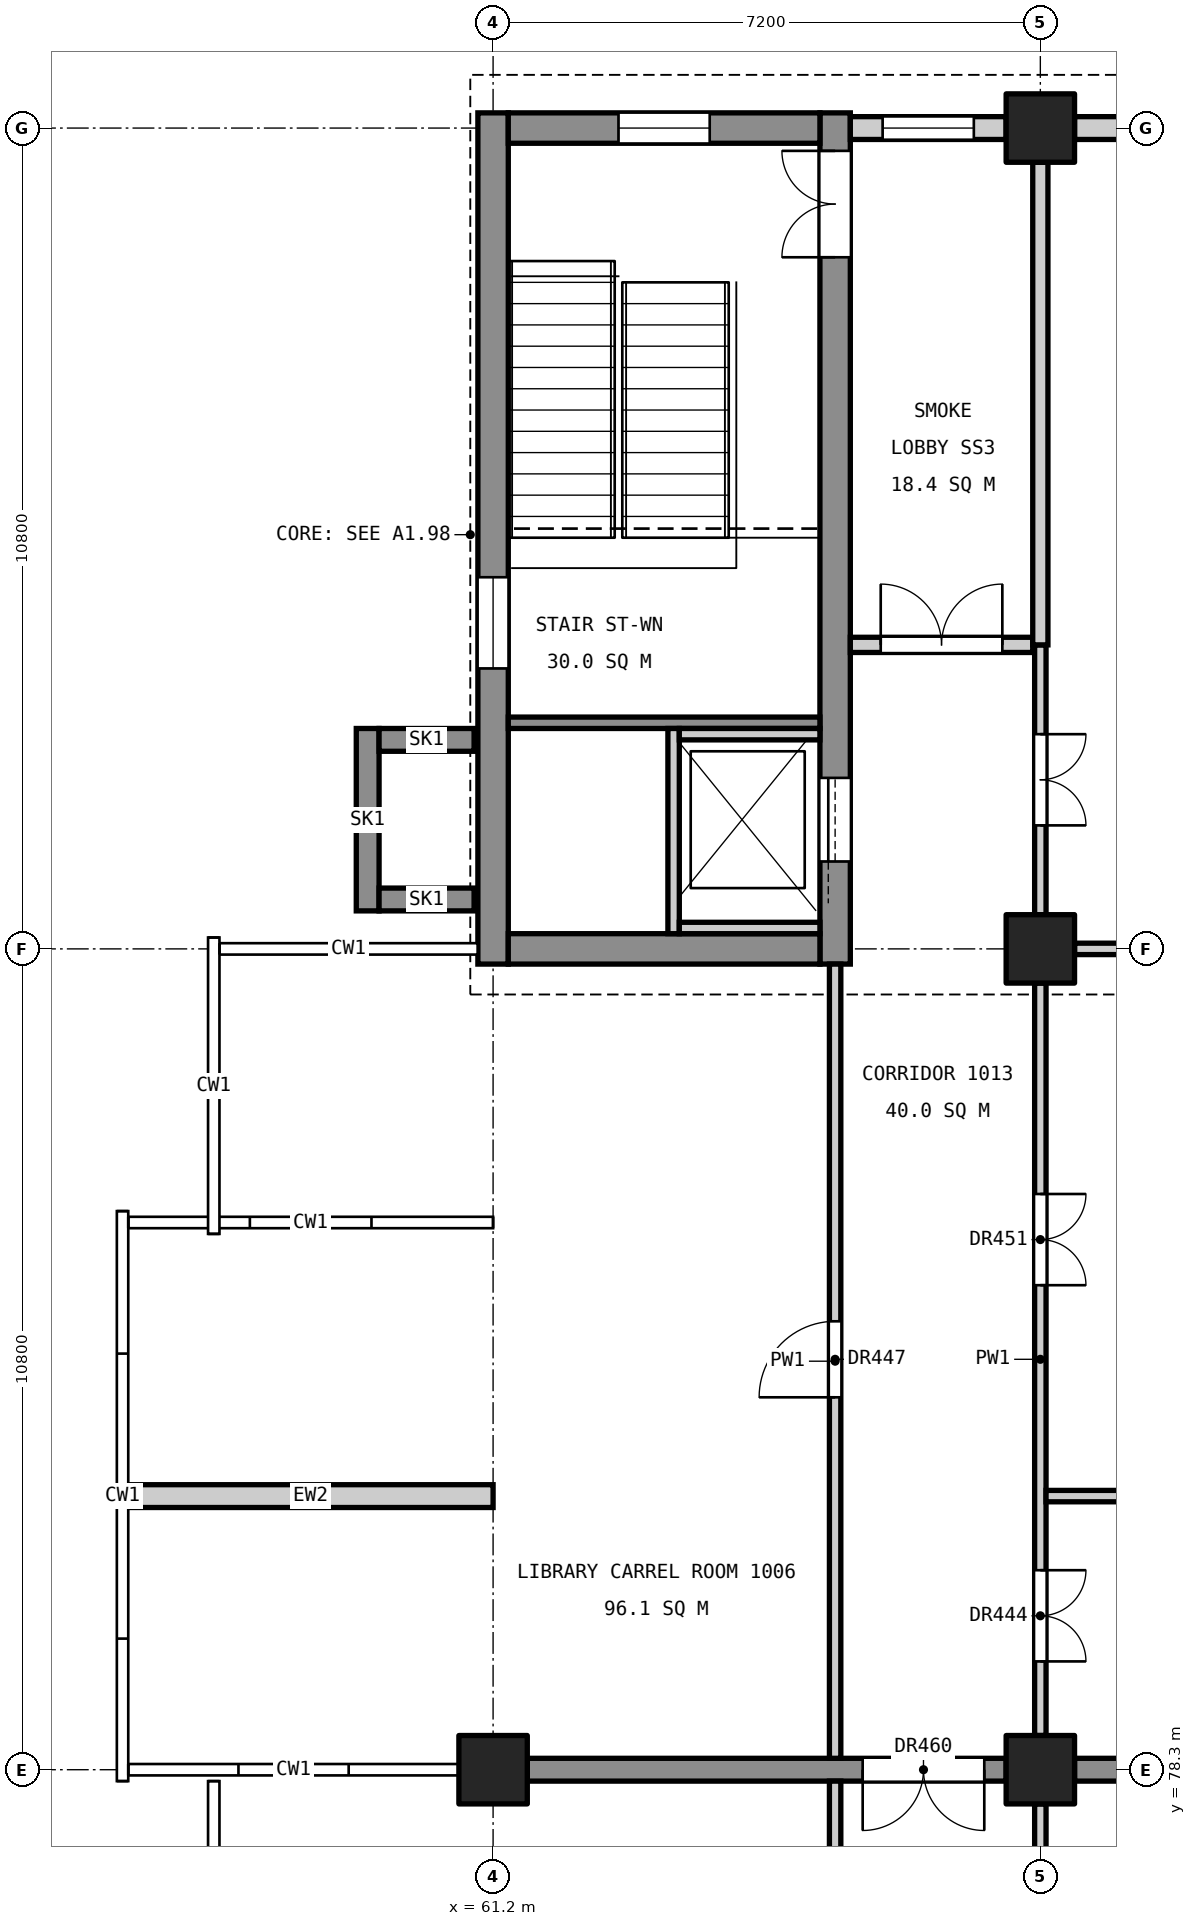
"""IFC4 building model, lengths in metres.
Left out: names, types, materials, properties, quantities, classifications, styles, units other than length and angle.
Written with IfcOpenShell. Run it as: python <this file> out.ifc"""

import sys

from ifc_helpers import new_model, si_unit, direction, frame, frame_2d, origin, origin_2d, place, context, subcontext, project, spatial, rectangle, extrude, element, fill, save


model = new_model("IFC4")
c1 = context("Model", 3, precision=1e-05, world=origin(), true_north=direction((0.0, 1.0)))
c2 = subcontext(c1, "Body", "Model", "MODEL_VIEW")
j1 = project(units=[si_unit("LENGTHUNIT", "METRE"), si_unit("PLANEANGLEUNIT", "RADIAN")], contexts=[c1])
p1 = place(None, origin())
s1 = spatial("IfcSite", under=j1, at=p1, CompositionType="ELEMENT")
p2 = place(p1, origin())
s2 = spatial("IfcBuilding", under=s1, at=p2, CompositionType="ELEMENT")
p3 = place(p2, frame((0.0, 0.0, 51.0)))
s3 = spatial("IfcBuildingStorey", under=s2, at=p3, CompositionType="ELEMENT", Elevation=51.0)
for number, where, z_axis, x_axis in (
    (1, (61.2, 78.3, 0.0), (0.0, 0.0, 1.0), (1.0, 0.0, 0.0)),
    (2, (68.4, 78.3, 0.0), (0.0, 0.0, 1.0), (1.0, 0.0, 0.0)),
    (3, (68.4, 89.1, 0.0), (0.0, 0.0, 1.0), (1.0, 0.0, 0.0)),
    (4, (68.4, 99.9, 0.0), (0.0, 0.0, 1.0), (1.0, 0.0, 0.0)),
):
    element("IfcColumn", number, at=place(p3, frame(where, z_axis=z_axis, x_axis=x_axis)), inside=s3, PredefinedType="COLUMN", context=c2, shape_type="SweptSolid", body=[
        extrude(rectangle(XDim=0.9, YDim=0.9, at=origin_2d()), origin(), (0.0, 0.0, 1.0), 4.8),
    ])
p4 = place(p3, frame((61.2, 88.9, 0.0), z_axis=(0.0, 0.0, 1.0), x_axis=(0.0, 1.0, 0.0)))
e5 = element("IfcWall", 5, at=p4, inside=s3, PredefinedType="SHEAR", context=c2, shape_type="SweptSolid", body=[
    extrude(rectangle(XDim=11.2, YDim=0.4, at=frame_2d((5.6, 0.0))), origin(), (0.0, 0.0, 1.0), 4.55),
])
p5 = place(p4, frame((3.89, 0.0, 3.4)))
e6 = element("IfcOpeningElement", 6, at=p5, cuts=e5, PredefinedType="OPENING", context=c2, shape_type="SweptSolid", body=[
    extrude(rectangle(XDim=1.2, YDim=0.9, at=frame_2d((0.6, 0.45))), frame((0.0, 0.21, 0.0), z_axis=(0.0, -1.0, 0.0), x_axis=(1.0, 0.0, 0.0)), (0.0, 0.0, 1.0), 0.42),
])
p6 = place(p3, frame((65.7, 88.9, 0.0), z_axis=(0.0, 0.0, 1.0), x_axis=(0.0, 1.0, 0.0)))
e7 = element("IfcWall", 7, at=p6, inside=s3, PredefinedType="SHEAR", context=c2, shape_type="SweptSolid", body=[
    extrude(rectangle(XDim=11.2, YDim=0.4, at=frame_2d((5.6, 0.0))), origin(), (0.0, 0.0, 1.0), 4.55),
])
p7 = place(p6, frame((9.3, 0.0, 0.0)))
e8 = element("IfcOpeningElement", 8, at=p7, cuts=e7, PredefinedType="OPENING", context=c2, shape_type="SweptSolid", body=[
    extrude(rectangle(XDim=1.4, YDim=2.1, at=frame_2d((0.7, 1.05))), frame((0.0, 0.21, 0.0), z_axis=(0.0, -1.0, 0.0), x_axis=(1.0, 0.0, 0.0)), (0.0, 0.0, 1.0), 0.42),
])
p8 = place(p6, frame((1.35, 0.0, 0.0)))
e9 = element("IfcOpeningElement", 9, at=p8, cuts=e7, PredefinedType="OPENING", context=c2, shape_type="SweptSolid", body=[
    extrude(rectangle(XDim=1.1, YDim=2.1, at=frame_2d((0.55, 1.05))), frame((0.0, 0.21, 0.0), z_axis=(0.0, -1.0, 0.0), x_axis=(1.0, 0.0, 0.0)), (0.0, 0.0, 1.0), 0.42),
])
p9 = place(p3, frame((61.4, 89.1, 0.0), z_axis=(0.0, 0.0, 1.0), x_axis=(1.0, 0.0, 0.0)))
e10 = element("IfcWall", 10, at=p9, inside=s3, PredefinedType="SHEAR", context=c2, shape_type="SweptSolid", body=[
    extrude(rectangle(XDim=4.1, YDim=0.4, at=frame_2d((2.05, 0.0))), origin(), (0.0, 0.0, 1.0), 4.55),
])
p10 = place(p3, frame((61.4, 99.9, 0.0), z_axis=(0.0, 0.0, 1.0), x_axis=(1.0, 0.0, 0.0)))
e11 = element("IfcWall", 11, at=p10, inside=s3, PredefinedType="SHEAR", context=c2, shape_type="SweptSolid", body=[
    extrude(rectangle(XDim=4.1, YDim=0.4, at=frame_2d((2.05, 0.0))), origin(), (0.0, 0.0, 1.0), 4.55),
])
p11 = place(p10, frame((1.45, 0.0, 3.4)))
e12 = element("IfcOpeningElement", 12, at=p11, cuts=e11, PredefinedType="OPENING", context=c2, shape_type="SweptSolid", body=[
    extrude(rectangle(XDim=1.2, YDim=0.9, at=frame_2d((0.6, 0.45))), frame((0.0, 0.21, 0.0), z_axis=(0.0, -1.0, 0.0), x_axis=(1.0, 0.0, 0.0)), (0.0, 0.0, 1.0), 0.42),
])
p12 = place(p3, frame((59.55, 89.6, 0.0), z_axis=(0.0, 0.0, 1.0), x_axis=(0.0, 1.0, 0.0)))
e13 = element("IfcWall", 13, at=p12, inside=s3, PredefinedType="SHEAR", context=c2, shape_type="SweptSolid", body=[
    extrude(rectangle(XDim=2.4, YDim=0.3, at=frame_2d((1.2, 0.0))), origin(), (0.0, 0.0, 1.0), 4.8),
])
for number, where, z_axis, x_axis in (
    (14, (60.95, 89.75, 0.0), (0.0, 0.0, 1.0), (-1.0, 0.0, 0.0)),
    (15, (60.95, 91.85, 0.0), (0.0, 0.0, 1.0), (-1.0, 0.0, 0.0)),
):
    element("IfcWall", number, at=place(p3, frame(where, z_axis=z_axis, x_axis=x_axis)), inside=s3, PredefinedType="SHEAR", context=c2, shape_type="SweptSolid", body=[
        extrude(rectangle(XDim=1.25, YDim=0.3, at=frame_2d((0.625, 0.0))), origin(), (0.0, 0.0, 1.0), 4.8),
    ])
p13 = place(p3, frame((61.65, 78.3, 0.0), z_axis=(0.0, 0.0, 1.0), x_axis=(1.0, 0.0, 0.0)))
e16 = element("IfcWall", 16, at=p13, inside=s3, PredefinedType="SHEAR", context=c2, shape_type="SweptSolid", body=[
    extrude(rectangle(XDim=6.3, YDim=0.3, at=frame_2d((3.15, 0.0))), origin(), (0.0, 0.0, 1.0), 4.55),
])
p14 = place(p13, frame((4.413, 0.0, 0.0)))
e17 = element("IfcOpeningElement", 17, at=p14, cuts=e16, PredefinedType="OPENING", context=c2, shape_type="SweptSolid", body=[
    extrude(rectangle(XDim=1.6, YDim=2.1, at=frame_2d((0.8, 1.05))), frame((0.0, 0.16, 0.0), z_axis=(0.0, -1.0, 0.0), x_axis=(1.0, 0.0, 0.0)), (0.0, 0.0, 1.0), 0.32),
])
p15 = place(p3, frame((68.85, 78.3, 0.0), z_axis=(0.0, 0.0, 1.0), x_axis=(1.0, 0.0, 0.0)))
e18 = element("IfcWall", 18, at=p15, inside=s3, PredefinedType="SHEAR", context=c2, shape_type="SweptSolid", body=[
    extrude(rectangle(XDim=9.9, YDim=0.3, at=frame_2d((4.95, 0.0))), origin(), (0.0, 0.0, 1.0), 4.55),
])
p16 = place(p3, frame((61.4, 92.075, 0.0), z_axis=(0.0, 0.0, 1.0), x_axis=(1.0, 0.0, 0.0)))
e19 = element("IfcWall", 19, at=p16, inside=s3, PredefinedType="SOLIDWALL", context=c2, shape_type="SweptSolid", body=[
    extrude(rectangle(XDim=4.1, YDim=0.15, at=frame_2d((2.05, 0.0))), origin(), (0.0, 0.0, 1.0), 4.55),
])
p17 = place(p3, frame((63.575, 92.0, 0.0), z_axis=(0.0, 0.0, 1.0), x_axis=(0.0, -1.0, 0.0)))
e20 = element("IfcWall", 20, at=p17, inside=s3, PredefinedType="SOLIDWALL", context=c2, shape_type="SweptSolid", body=[
    extrude(rectangle(XDim=2.7, YDim=0.15, at=frame_2d((1.35, 0.0))), origin(), (0.0, 0.0, 1.0), 4.8),
])
for number, where, z_axis, x_axis in (
    (21, (63.65, 91.925, 0.0), (0.0, 0.0, 1.0), (1.0, 0.0, 0.0)),
    (22, (63.65, 89.375, 0.0), (0.0, 0.0, 1.0), (1.0, 0.0, 0.0)),
):
    element("IfcWall", number, at=place(p3, frame(where, z_axis=z_axis, x_axis=x_axis)), inside=s3, PredefinedType="SOLIDWALL", context=c2, shape_type="SweptSolid", body=[
        extrude(rectangle(XDim=1.85, YDim=0.15, at=frame_2d((0.925, 0.0))), origin(), (0.0, 0.0, 1.0), 4.8),
    ])
p18 = place(p3, frame((65.9, 99.9, 0.0), z_axis=(0.0, 0.0, 1.0), x_axis=(1.0, 0.0, 0.0)))
e23 = element("IfcWall", 23, at=p18, inside=s3, PredefinedType="STANDARD", context=c2, shape_type="SweptSolid", body=[
    extrude(rectangle(XDim=2.05, YDim=0.3, at=frame_2d((1.025, 0.0))), origin(), (0.0, 0.0, 1.0), 3.85),
])
p19 = place(p18, frame((0.425, 0.0, 0.9)))
e24 = element("IfcOpeningElement", 24, at=p19, cuts=e23, PredefinedType="OPENING", context=c2, shape_type="SweptSolid", body=[
    extrude(rectangle(XDim=1.2, YDim=2.4, at=frame_2d((0.6, 1.2))), frame((0.0, 0.16, 0.0), z_axis=(0.0, -1.0, 0.0), x_axis=(1.0, 0.0, 0.0)), (0.0, 0.0, 1.0), 0.32),
])
p20 = place(p3, frame((68.85, 99.9, 0.0), z_axis=(0.0, 0.0, 1.0), x_axis=(1.0, 0.0, 0.0)))
e25 = element("IfcWall", 25, at=p20, inside=s3, PredefinedType="STANDARD", context=c2, shape_type="SweptSolid", body=[
    extrude(rectangle(XDim=9.9, YDim=0.3, at=frame_2d((4.95, 0.0))), origin(), (0.0, 0.0, 1.0), 3.85),
])
p21 = place(p20, frame((0.675, 0.0, 0.9)))
e26 = element("IfcOpeningElement", 26, at=p21, cuts=e25, PredefinedType="OPENING", context=c2, shape_type="SweptSolid", body=[
    extrude(rectangle(XDim=1.8, YDim=2.4, at=frame_2d((0.9, 1.2))), frame((0.0, 0.16, 0.0), z_axis=(0.0, -1.0, 0.0), x_axis=(1.0, 0.0, 0.0)), (0.0, 0.0, 1.0), 0.32),
])
p22 = place(p20, frame((4.575, 0.0, 0.8)))
e27 = element("IfcOpeningElement", 27, at=p22, cuts=e25, PredefinedType="OPENING", context=c2, shape_type="SweptSolid", body=[
    extrude(rectangle(XDim=0.75, YDim=1.2, at=frame_2d((0.375, 0.6))), frame((0.0, 0.16, 0.0), z_axis=(0.0, -1.0, 0.0), x_axis=(1.0, 0.0, 0.0)), (0.0, 0.0, 1.0), 0.32),
])
p23 = place(p20, frame((7.425, 0.0, 0.9)))
e28 = element("IfcOpeningElement", 28, at=p23, cuts=e25, PredefinedType="OPENING", context=c2, shape_type="SweptSolid", body=[
    extrude(rectangle(XDim=1.8, YDim=2.4, at=frame_2d((0.9, 1.2))), frame((0.0, 0.16, 0.0), z_axis=(0.0, -1.0, 0.0), x_axis=(1.0, 0.0, 0.0)), (0.0, 0.0, 1.0), 0.32),
])
p24 = place(p3, frame((56.4, 81.9, 0.0), z_axis=(0.0, 0.0, 1.0), x_axis=(1.0, 0.0, 0.0)))
e29 = element("IfcWall", 29, at=p24, inside=s3, PredefinedType="STANDARD", context=c2, shape_type="SweptSolid", body=[
    extrude(rectangle(XDim=4.8, YDim=0.3, at=frame_2d((2.4, 0.0))), origin(), (0.0, 0.0, 1.0), 3.65),
])
p25 = place(p3, frame((65.7, 74.9, 0.0), z_axis=(0.0, 0.0, 1.0), x_axis=(0.0, 1.0, 0.0)))
e30 = element("IfcWall", 30, at=p25, inside=s3, PredefinedType="PARTITIONING", context=c2, shape_type="SweptSolid", body=[
    extrude(rectangle(XDim=3.25, YDim=0.15, at=frame_2d((1.625, 0.0))), origin(), (0.0, 0.0, 1.0), 3.55),
])
p26 = place(p25, frame((1.1, 0.0, 0.0)))
e31 = element("IfcOpeningElement", 31, at=p26, cuts=e30, PredefinedType="OPENING", context=c2, shape_type="SweptSolid", body=[
    extrude(rectangle(XDim=1.0, YDim=2.1, at=frame_2d((0.5, 1.05))), frame((0.0, 0.085, 0.0), z_axis=(0.0, -1.0, 0.0), x_axis=(1.0, 0.0, 0.0)), (0.0, 0.0, 1.0), 0.17),
])
p27 = place(p3, frame((65.7, 78.45, 0.0), z_axis=(0.0, 0.0, 1.0), x_axis=(0.0, 1.0, 0.0)))
e32 = element("IfcWall", 32, at=p27, inside=s3, PredefinedType="PARTITIONING", context=c2, shape_type="SweptSolid", body=[
    extrude(rectangle(XDim=10.45, YDim=0.15, at=frame_2d((5.225, 0.0))), origin(), (0.0, 0.0, 1.0), 3.55),
])
p28 = place(p27, frame((4.75, 0.0, 0.0)))
e33 = element("IfcOpeningElement", 33, at=p28, cuts=e32, PredefinedType="OPENING", context=c2, shape_type="SweptSolid", body=[
    extrude(rectangle(XDim=1.0, YDim=2.1, at=frame_2d((0.5, 1.05))), frame((0.0, 0.085, 0.0), z_axis=(0.0, -1.0, 0.0), x_axis=(1.0, 0.0, 0.0)), (0.0, 0.0, 1.0), 0.17),
])
p29 = place(p3, frame((65.9, 93.1, 0.0), z_axis=(0.0, 0.0, 1.0), x_axis=(1.0, 0.0, 0.0)))
e34 = element("IfcWall", 34, at=p29, inside=s3, PredefinedType="PARTITIONING", context=c2, shape_type="SweptSolid", body=[
    extrude(rectangle(XDim=2.4, YDim=0.2, at=frame_2d((1.2, 0.0))), origin(), (0.0, 0.0, 1.0), 3.55),
])
p30 = place(p29, frame((0.4, 0.0, 0.0)))
e35 = element("IfcOpeningElement", 35, at=p30, cuts=e34, PredefinedType="OPENING", context=c2, shape_type="SweptSolid", body=[
    extrude(rectangle(XDim=1.6, YDim=2.1, at=frame_2d((0.8, 1.05))), frame((0.0, 0.11, 0.0), z_axis=(0.0, -1.0, 0.0), x_axis=(1.0, 0.0, 0.0)), (0.0, 0.0, 1.0), 0.22),
])
p31 = place(p3, frame((68.4, 70.8, 0.0), z_axis=(0.0, 0.0, 1.0), x_axis=(0.0, 1.0, 0.0)))
e36 = element("IfcWall", 36, at=p31, inside=s3, PredefinedType="PARTITIONING", context=c2, shape_type="SweptSolid", body=[
    extrude(rectangle(XDim=7.05, YDim=0.15, at=frame_2d((3.525, 0.0))), origin(), (0.0, 0.0, 1.0), 3.55),
])
p32 = place(p31, frame((3.075, 0.0, 0.0)))
e37 = element("IfcOpeningElement", 37, at=p32, cuts=e36, PredefinedType="OPENING", context=c2, shape_type="SweptSolid", body=[
    extrude(rectangle(XDim=1.2, YDim=2.1, at=frame_2d((0.6, 1.05))), frame((0.0, 0.085, 0.0), z_axis=(0.0, -1.0, 0.0), x_axis=(1.0, 0.0, 0.0)), (0.0, 0.0, 1.0), 0.17),
])
p33 = place(p3, frame((68.4, 78.75, 0.0), z_axis=(0.0, 0.0, 1.0), x_axis=(0.0, 1.0, 0.0)))
e38 = element("IfcWall", 38, at=p33, inside=s3, PredefinedType="PARTITIONING", context=c2, shape_type="SweptSolid", body=[
    extrude(rectangle(XDim=9.9, YDim=0.15, at=frame_2d((4.95, 0.0))), origin(), (0.0, 0.0, 1.0), 3.55),
])
p34 = place(p33, frame((0.975, 0.0, 0.0)))
e39 = element("IfcOpeningElement", 39, at=p34, cuts=e38, PredefinedType="OPENING", context=c2, shape_type="SweptSolid", body=[
    extrude(rectangle(XDim=1.2, YDim=2.1, at=frame_2d((0.6, 1.05))), frame((0.0, 0.085, 0.0), z_axis=(0.0, -1.0, 0.0), x_axis=(1.0, 0.0, 0.0)), (0.0, 0.0, 1.0), 0.17),
])
p35 = place(p33, frame((5.925, 0.0, 0.0)))
e40 = element("IfcOpeningElement", 40, at=p35, cuts=e38, PredefinedType="OPENING", context=c2, shape_type="SweptSolid", body=[
    extrude(rectangle(XDim=1.2, YDim=2.1, at=frame_2d((0.6, 1.05))), frame((0.0, 0.085, 0.0), z_axis=(0.0, -1.0, 0.0), x_axis=(1.0, 0.0, 0.0)), (0.0, 0.0, 1.0), 0.17),
])
p36 = place(p3, frame((68.4, 89.55, 0.0), z_axis=(0.0, 0.0, 1.0), x_axis=(0.0, 1.0, 0.0)))
e41 = element("IfcWall", 41, at=p36, inside=s3, PredefinedType="PARTITIONING", context=c2, shape_type="SweptSolid", body=[
    extrude(rectangle(XDim=3.55, YDim=0.15, at=frame_2d((1.775, 0.0))), origin(), (0.0, 0.0, 1.0), 3.55),
])
p37 = place(p36, frame((1.175, 0.0, 0.0)))
e42 = element("IfcOpeningElement", 42, at=p37, cuts=e41, PredefinedType="OPENING", context=c2, shape_type="SweptSolid", body=[
    extrude(rectangle(XDim=1.2, YDim=2.1, at=frame_2d((0.6, 1.05))), frame((0.0, 0.085, 0.0), z_axis=(0.0, -1.0, 0.0), x_axis=(1.0, 0.0, 0.0)), (0.0, 0.0, 1.0), 0.17),
])
p38 = place(p3, frame((68.4, 93.1, 0.0), z_axis=(0.0, 0.0, 1.0), x_axis=(0.0, 1.0, 0.0)))
e43 = element("IfcWall", 43, at=p38, inside=s3, PredefinedType="PARTITIONING", context=c2, shape_type="SweptSolid", body=[
    extrude(rectangle(XDim=6.35, YDim=0.2, at=frame_2d((3.175, 0.0))), origin(), (0.0, 0.0, 1.0), 3.55),
])
p39 = place(p3, frame((68.475, 81.9, 0.0), z_axis=(0.0, 0.0, 1.0), x_axis=(1.0, 0.0, 0.0)))
e44 = element("IfcWall", 44, at=p39, inside=s3, PredefinedType="PARTITIONING", context=c2, shape_type="SweptSolid", body=[
    extrude(rectangle(XDim=10.575, YDim=0.15, at=frame_2d((5.288, 0.0))), origin(), (0.0, 0.0, 1.0), 3.85),
])
p40 = place(p3, frame((68.85, 89.1, 0.0), z_axis=(0.0, 0.0, 1.0), x_axis=(1.0, 0.0, 0.0)))
e45 = element("IfcWall", 45, at=p40, inside=s3, PredefinedType="PARTITIONING", context=c2, shape_type="SweptSolid", body=[
    extrude(rectangle(XDim=9.9, YDim=0.15, at=frame_2d((4.95, 0.0))), origin(), (0.0, 0.0, 1.0), 3.85),
])
p41 = place(p7, origin())
e46 = element("IfcDoor", 46, at=p41, inside=s3, OperationType="DOUBLE_DOOR_SINGLE_SWING", PredefinedType="DOOR", context=c2, shape_type="SweptSolid", body=[
    extrude(rectangle(XDim=1.4, YDim=2.1, at=frame_2d((0.7, 1.05))), frame((0.0, 0.025, 0.0), z_axis=(0.0, -1.0, 0.0), x_axis=(1.0, 0.0, 0.0)), (0.0, 0.0, 1.0), 0.05),
])
fill(e8, e46)
p42 = place(p8, origin())
e47 = element("IfcDoor", 47, at=p42, inside=s3, OperationType="SLIDING_TO_LEFT", PredefinedType="DOOR", context=c2, shape_type="SweptSolid", body=[
    extrude(rectangle(XDim=1.1, YDim=2.1, at=frame_2d((0.55, 1.05))), frame((0.0, 0.025, 0.0), z_axis=(0.0, -1.0, 0.0), x_axis=(1.0, 0.0, 0.0)), (0.0, 0.0, 1.0), 0.05),
])
fill(e9, e47)
p43 = place(p19, origin())
e48 = element("IfcWindow", 48, at=p43, inside=s3, PartitioningType="SINGLE_PANEL", PredefinedType="WINDOW", context=c2, shape_type="SweptSolid", body=[
    extrude(rectangle(XDim=1.2, YDim=2.4, at=frame_2d((0.6, 1.2))), frame((0.0, 0.03, 0.0), z_axis=(0.0, -1.0, 0.0), x_axis=(1.0, 0.0, 0.0)), (0.0, 0.0, 1.0), 0.06),
])
fill(e24, e48)
p44 = place(p5, origin())
e49 = element("IfcWindow", 49, at=p44, inside=s3, PartitioningType="SINGLE_PANEL", PredefinedType="WINDOW", context=c2, shape_type="SweptSolid", body=[
    extrude(rectangle(XDim=1.2, YDim=0.9, at=frame_2d((0.6, 0.45))), frame((0.0, 0.03, 0.0), z_axis=(0.0, -1.0, 0.0), x_axis=(1.0, 0.0, 0.0)), (0.0, 0.0, 1.0), 0.06),
])
fill(e6, e49)
p45 = place(p11, origin())
e50 = element("IfcWindow", 50, at=p45, inside=s3, PartitioningType="SINGLE_PANEL", PredefinedType="WINDOW", context=c2, shape_type="SweptSolid", body=[
    extrude(rectangle(XDim=1.2, YDim=0.9, at=frame_2d((0.6, 0.45))), frame((0.0, 0.03, 0.0), z_axis=(0.0, -1.0, 0.0), x_axis=(1.0, 0.0, 0.0)), (0.0, 0.0, 1.0), 0.06),
])
fill(e12, e50)
p46 = place(p34, frame((1.2, 0.0, 0.0), z_axis=(0.0, 0.0, 1.0), x_axis=(-1.0, 0.0, 0.0)))
e51 = element("IfcDoor", 51, at=p46, inside=s3, OperationType="DOUBLE_DOOR_SINGLE_SWING", PredefinedType="DOOR", context=c2, shape_type="SweptSolid", body=[
    extrude(rectangle(XDim=1.2, YDim=2.1, at=frame_2d((0.6, 1.05))), frame((0.0, 0.025, 0.0), z_axis=(0.0, -1.0, 0.0), x_axis=(1.0, 0.0, 0.0)), (0.0, 0.0, 1.0), 0.05),
])
fill(e39, e51)
p47 = place(p37, frame((1.2, 0.0, 0.0), z_axis=(0.0, 0.0, 1.0), x_axis=(-1.0, 0.0, 0.0)))
e52 = element("IfcDoor", 52, at=p47, inside=s3, OperationType="DOUBLE_DOOR_SINGLE_SWING", PredefinedType="DOOR", context=c2, shape_type="SweptSolid", body=[
    extrude(rectangle(XDim=1.2, YDim=2.1, at=frame_2d((0.6, 1.05))), frame((0.0, 0.025, 0.0), z_axis=(0.0, -1.0, 0.0), x_axis=(1.0, 0.0, 0.0)), (0.0, 0.0, 1.0), 0.05),
])
fill(e42, e52)
p48 = place(p28, origin())
e53 = element("IfcDoor", 53, at=p48, inside=s3, OperationType="SINGLE_SWING_LEFT", PredefinedType="DOOR", context=c2, shape_type="SweptSolid", body=[
    extrude(rectangle(XDim=1.0, YDim=2.1, at=frame_2d((0.5, 1.05))), frame((0.0, 0.025, 0.0), z_axis=(0.0, -1.0, 0.0), x_axis=(1.0, 0.0, 0.0)), (0.0, 0.0, 1.0), 0.05),
])
fill(e33, e53)
p49 = place(p35, frame((1.2, 0.0, 0.0), z_axis=(0.0, 0.0, 1.0), x_axis=(-1.0, 0.0, 0.0)))
e54 = element("IfcDoor", 54, at=p49, inside=s3, OperationType="DOUBLE_DOOR_SINGLE_SWING", PredefinedType="DOOR", context=c2, shape_type="SweptSolid", body=[
    extrude(rectangle(XDim=1.2, YDim=2.1, at=frame_2d((0.6, 1.05))), frame((0.0, 0.025, 0.0), z_axis=(0.0, -1.0, 0.0), x_axis=(1.0, 0.0, 0.0)), (0.0, 0.0, 1.0), 0.05),
])
fill(e40, e54)
p50 = place(p30, origin())
e55 = element("IfcDoor", 55, at=p50, inside=s3, OperationType="DOUBLE_DOOR_SINGLE_SWING", PredefinedType="DOOR", context=c2, shape_type="SweptSolid", body=[
    extrude(rectangle(XDim=1.6, YDim=2.1, at=frame_2d((0.8, 1.05))), frame((0.0, 0.025, 0.0), z_axis=(0.0, -1.0, 0.0), x_axis=(1.0, 0.0, 0.0)), (0.0, 0.0, 1.0), 0.05),
])
fill(e35, e55)
p51 = place(p14, frame((1.6, 0.0, 0.0), z_axis=(0.0, 0.0, 1.0), x_axis=(-1.0, 0.0, 0.0)))
e56 = element("IfcDoor", 56, at=p51, inside=s3, OperationType="DOUBLE_DOOR_SINGLE_SWING", PredefinedType="DOOR", context=c2, shape_type="SweptSolid", body=[
    extrude(rectangle(XDim=1.6, YDim=2.1, at=frame_2d((0.8, 1.05))), frame((0.0, 0.025, 0.0), z_axis=(0.0, -1.0, 0.0), x_axis=(1.0, 0.0, 0.0)), (0.0, 0.0, 1.0), 0.05),
])
fill(e17, e56)
save(model, sys.argv[1])
